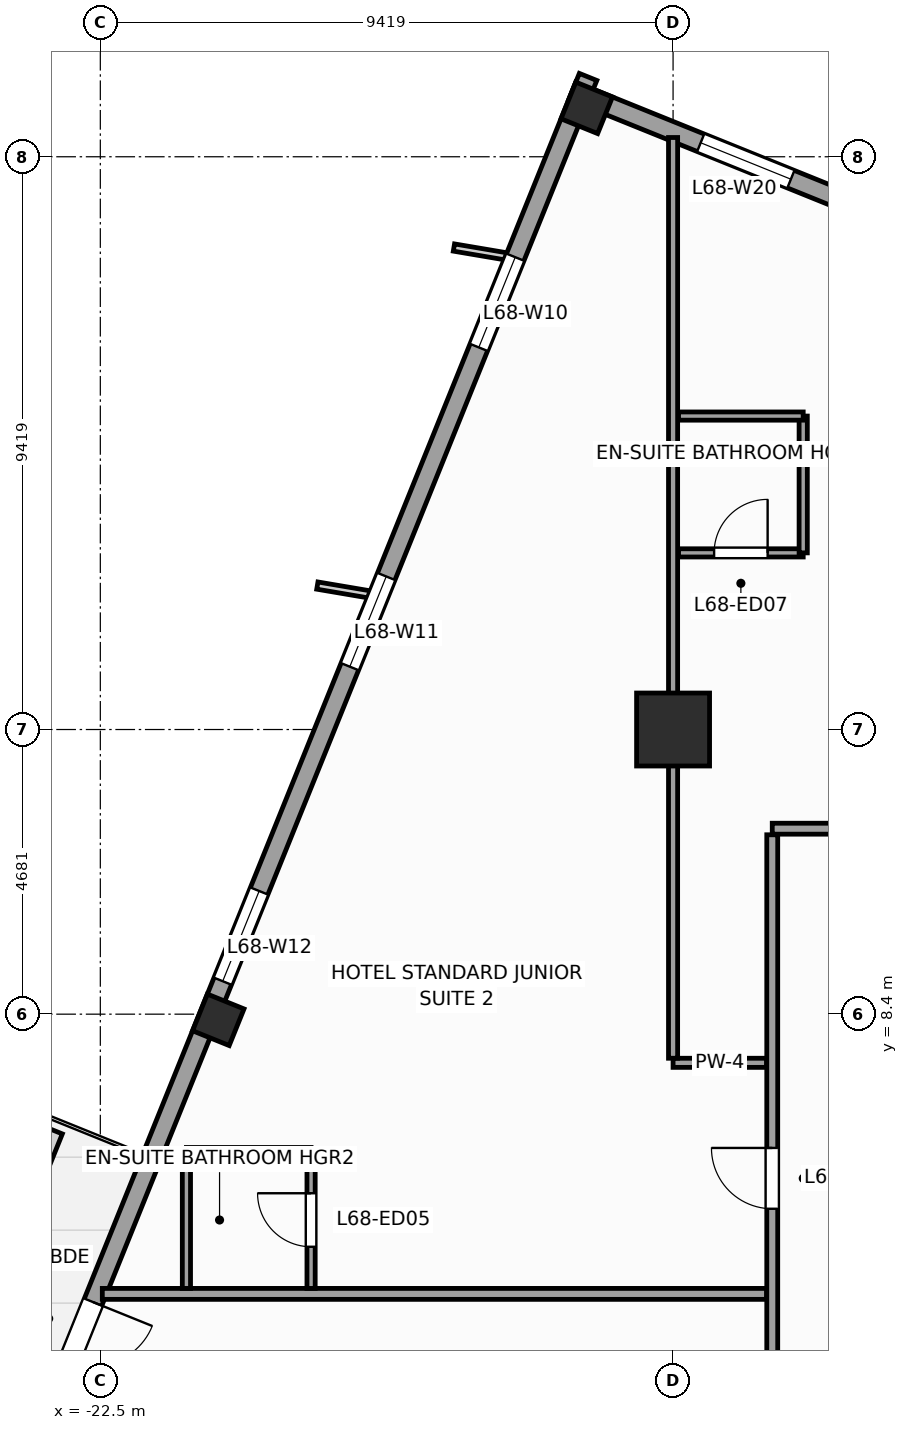
"""IFC4 building model, lengths in metres.
Left out: names, types, materials, properties, quantities, classifications, styles, units other than length and angle.
Written with IfcOpenShell. Run it as: python <this file> out.ifc"""

import sys

from ifc_helpers import new_model, si_unit, direction, frame, frame_2d, origin, origin_2d, place, context, subcontext, project, spatial, rectangle, extrude, source, transform, mapped, element, fill, save


model = new_model("IFC4")
c1 = context("Model", 3, precision=1e-05, world=origin(), true_north=direction((0.0, 1.0)))
c2 = subcontext(c1, "Body", "Model", "MODEL_VIEW")
j1 = project(units=[si_unit("LENGTHUNIT", "METRE"), si_unit("PLANEANGLEUNIT", "RADIAN")], contexts=[c1])
p1 = place(None, origin())
s1 = spatial("IfcSite", under=j1, at=p1, CompositionType="ELEMENT")
p2 = place(p1, origin())
s2 = spatial("IfcBuilding", under=s1, at=p2, CompositionType="ELEMENT")
p3 = place(p2, frame((0.0, 0.0, 279.6)))
s3 = spatial("IfcBuildingStorey", under=s2, at=p3, CompositionType="ELEMENT", Elevation=279.6)
m1 = source(origin(), c2, "Body", "SweptSolid", [
    extrude(rectangle(XDim=1.2, YDim=1.2, at=origin_2d()), origin(), (0.0, 0.0, 1.0), 3.6),
])
p4 = place(p3, frame((-13.081, 13.081, 0.0), z_axis=(0.0, 0.0, 1.0), x_axis=(1.0, 0.0, 0.0)))
e1 = element("IfcColumn", 1, at=p4, inside=s3, PredefinedType="COLUMN", context=c2, shape_type="MappedRepresentation", body=[
    mapped(m1, transform((0.0, 0.0, 0.0), scale=1.0)),
])
m2 = source(origin(), c2, "Body", "SweptSolid", [
    extrude(rectangle(XDim=0.65, YDim=0.65, at=origin_2d()), origin(), (0.0, 0.0, 1.0), 3.6),
])
for number, where, z_axis, x_axis in (
    (2, (-14.501, 23.304, 0.0), (0.0, 0.0, 1.0), (0.375, 0.927, 0.0)),
    (3, (-20.56, 8.307, 0.0), (0.0, 0.0, 1.0), (0.375, 0.927, 0.0)),
):
    element("IfcColumn", number, at=place(p3, frame(where, z_axis=z_axis, x_axis=x_axis)), inside=s3, PredefinedType="COLUMN", context=c2, shape_type="MappedRepresentation", body=[
        mapped(m2, transform((0.0, 0.0, 0.0), scale=1.0)),
    ])
p5 = place(p3, frame((-9.032, 21.278, 0.0), z_axis=(0.0, 0.0, 1.0), x_axis=(-0.927185411764, 0.374602739196, 0.0)))
e4 = element("IfcWall", 4, at=p5, inside=s3, PredefinedType="STANDARD", context=c2, shape_type="SweptSolid", body=[
    extrude(rectangle(XDim=6.155, YDim=0.31, at=frame_2d((3.078, 0.0))), origin(), (0.0, 0.0, 1.0), 3.35),
])
p6 = place(p5, frame((2.278, 0.0, 0.47)))
e5 = element("IfcOpeningElement", 5, at=p6, cuts=e4, PredefinedType="OPENING", context=c2, shape_type="SweptSolid", body=[
    extrude(rectangle(XDim=1.6, YDim=2.1, at=frame_2d((0.8, 1.05))), frame((0.0, 0.165, 0.0), z_axis=(0.0, -1.0, 0.0), x_axis=(1.0, 0.0, 0.0)), (0.0, 0.0, 1.0), 0.33),
])
p7 = place(p3, frame((-14.479, 23.813, 0.0), z_axis=(0.0, 0.0, 1.0), x_axis=(-0.374609557019, -0.927182657188, 0.0)))
e6 = element("IfcWall", 6, at=p7, inside=s3, PredefinedType="STANDARD", context=c2, shape_type="SweptSolid", body=[
    extrude(rectangle(XDim=33.31, YDim=0.31, at=frame_2d((16.655, 0.0))), origin(), (0.0, 0.0, 1.0), 2.75),
])
p8 = place(p7, frame((21.73, 0.0, 0.0)))
e7 = element("IfcOpeningElement", 7, at=p8, cuts=e6, PredefinedType="OPENING", context=c2, shape_type="SweptSolid", body=[
    extrude(rectangle(XDim=1.05, YDim=2.25, at=frame_2d((0.525, 1.125))), frame((0.0, 0.165, 0.0), z_axis=(0.0, -1.0, 0.0), x_axis=(1.0, 0.0, 0.0)), (0.0, 0.0, 1.0), 0.33),
])
p9 = place(p7, frame((3.197, 0.0, 0.47)))
e8 = element("IfcOpeningElement", 8, at=p9, cuts=e6, PredefinedType="OPENING", context=c2, shape_type="SweptSolid", body=[
    extrude(rectangle(XDim=1.6, YDim=2.1, at=frame_2d((0.8, 1.05))), frame((0.0, 0.165, 0.0), z_axis=(0.0, -1.0, 0.0), x_axis=(1.0, 0.0, 0.0)), (0.0, 0.0, 1.0), 0.33),
])
p10 = place(p7, frame((8.86, 0.0, 0.47)))
e9 = element("IfcOpeningElement", 9, at=p10, cuts=e6, PredefinedType="OPENING", context=c2, shape_type="SweptSolid", body=[
    extrude(rectangle(XDim=1.6, YDim=2.1, at=frame_2d((0.8, 1.05))), frame((0.0, 0.165, 0.0), z_axis=(0.0, -1.0, 0.0), x_axis=(1.0, 0.0, 0.0)), (0.0, 0.0, 1.0), 0.33),
])
p11 = place(p7, frame((14.439, 0.0, 0.47)))
e10 = element("IfcOpeningElement", 10, at=p11, cuts=e6, PredefinedType="OPENING", context=c2, shape_type="SweptSolid", body=[
    extrude(rectangle(XDim=1.6, YDim=2.1, at=frame_2d((0.8, 1.05))), frame((0.0, 0.165, 0.0), z_axis=(0.0, -1.0, 0.0), x_axis=(1.0, 0.0, 0.0)), (0.0, 0.0, 1.0), 0.33),
])
p12 = place(p7, frame((30.097, 0.0, 0.47)))
e11 = element("IfcOpeningElement", 11, at=p12, cuts=e6, PredefinedType="OPENING", context=c2, shape_type="SweptSolid", body=[
    extrude(rectangle(XDim=1.6, YDim=2.1, at=frame_2d((0.8, 1.05))), frame((0.0, 0.165, 0.0), z_axis=(0.0, -1.0, 0.0), x_axis=(1.0, 0.0, 0.0)), (0.0, 0.0, 1.0), 0.33),
])
p13 = place(p7, frame((27.59, 0.0, 0.47)))
e12 = element("IfcOpeningElement", 12, at=p13, cuts=e6, PredefinedType="OPENING", context=c2, shape_type="SweptSolid", body=[
    extrude(rectangle(XDim=1.6, YDim=2.1, at=frame_2d((0.8, 1.05))), frame((0.0, 0.165, 0.0), z_axis=(0.0, -1.0, 0.0), x_axis=(1.0, 0.0, 0.0)), (0.0, 0.0, 1.0), 0.33),
])
p14 = place(p3, frame((-11.45, 11.45, 0.0), z_axis=(0.0, 0.0, 1.0), x_axis=(1.0, 0.0, 0.0)))
e13 = element("IfcWall", 13, at=p14, inside=s3, PredefinedType="PARTITIONING", context=c2, shape_type="SweptSolid", body=[
    extrude(rectangle(XDim=21.75, YDim=0.18, at=frame_2d((10.875, 0.0))), origin(), (0.0, 0.0, 1.0), 3.35),
])
p15 = place(p14, frame((2.639, 0.0, 0.0)))
e14 = element("IfcOpeningElement", 14, at=p15, cuts=e13, PredefinedType="OPENING", context=c2, shape_type="SweptSolid", body=[
    extrude(rectangle(XDim=1.0, YDim=2.15, at=frame_2d((0.5, 1.075))), frame((0.0, 0.1, 0.0), z_axis=(0.0, -1.0, 0.0), x_axis=(1.0, 0.0, 0.0)), (0.0, 0.0, 1.0), 0.2),
])
p16 = place(p14, frame((7.8, 0.0, 0.0)))
e15 = element("IfcOpeningElement", 15, at=p16, cuts=e13, PredefinedType="OPENING", context=c2, shape_type="SweptSolid", body=[
    extrude(rectangle(XDim=1.0, YDim=2.15, at=frame_2d((0.5, 1.075))), frame((0.0, 0.1, 0.0), z_axis=(0.0, -1.0, 0.0), x_axis=(1.0, 0.0, 0.0)), (0.0, 0.0, 1.0), 0.2),
])
p17 = place(p14, frame((12.65, 0.0, 0.0)))
e16 = element("IfcOpeningElement", 16, at=p17, cuts=e13, PredefinedType="OPENING", context=c2, shape_type="SweptSolid", body=[
    extrude(rectangle(XDim=1.0, YDim=2.15, at=frame_2d((0.5, 1.075))), frame((0.0, 0.1, 0.0), z_axis=(0.0, -1.0, 0.0), x_axis=(1.0, 0.0, 0.0)), (0.0, 0.0, 1.0), 0.2),
])
p18 = place(p14, frame((18.036, 0.0, 0.0)))
e17 = element("IfcOpeningElement", 17, at=p18, cuts=e13, PredefinedType="OPENING", context=c2, shape_type="SweptSolid", body=[
    extrude(rectangle(XDim=1.0, YDim=2.15, at=frame_2d((0.5, 1.075))), frame((0.0, 0.1, 0.0), z_axis=(0.0, -1.0, 0.0), x_axis=(1.0, 0.0, 0.0)), (0.0, 0.0, 1.0), 0.2),
])
p19 = place(p3, frame((-11.45, -12.35, 0.0), z_axis=(0.0, 0.0, 1.0), x_axis=(0.0, 1.0, 0.0)))
e18 = element("IfcWall", 18, at=p19, inside=s3, PredefinedType="PARTITIONING", context=c2, shape_type="SweptSolid", body=[
    extrude(rectangle(XDim=23.7, YDim=0.18, at=frame_2d((11.85, 0.0))), origin(), (0.0, 0.0, 1.0), 3.35),
])
p20 = place(p19, frame((13.75, 0.0, 0.0)))
e19 = element("IfcOpeningElement", 19, at=p20, cuts=e18, PredefinedType="OPENING", context=c2, shape_type="SweptSolid", body=[
    extrude(rectangle(XDim=1.0, YDim=2.15, at=frame_2d((0.5, 1.075))), frame((0.0, 0.1, 0.0), z_axis=(0.0, -1.0, 0.0), x_axis=(1.0, 0.0, 0.0)), (0.0, 0.0, 1.0), 0.2),
])
p21 = place(p19, frame((17.55, 0.0, 0.0)))
e20 = element("IfcOpeningElement", 20, at=p21, cuts=e18, PredefinedType="OPENING", context=c2, shape_type="SweptSolid", body=[
    extrude(rectangle(XDim=1.0, YDim=2.15, at=frame_2d((0.5, 1.075))), frame((0.0, 0.1, 0.0), z_axis=(0.0, -1.0, 0.0), x_axis=(1.0, 0.0, 0.0)), (0.0, 0.0, 1.0), 0.2),
])
p22 = place(p19, frame((6.15, 0.0, 0.0)))
e21 = element("IfcOpeningElement", 21, at=p22, cuts=e18, PredefinedType="OPENING", context=c2, shape_type="SweptSolid", body=[
    extrude(rectangle(XDim=1.0, YDim=2.15, at=frame_2d((0.5, 1.075))), frame((0.0, 0.1, 0.0), z_axis=(0.0, -1.0, 0.0), x_axis=(1.0, 0.0, 0.0)), (0.0, 0.0, 1.0), 0.2),
])
p23 = place(p19, frame((9.95, 0.0, 0.0)))
e22 = element("IfcOpeningElement", 22, at=p23, cuts=e18, PredefinedType="OPENING", context=c2, shape_type="SweptSolid", body=[
    extrude(rectangle(XDim=1.0, YDim=2.15, at=frame_2d((0.5, 1.075))), frame((0.0, 0.1, 0.0), z_axis=(0.0, -1.0, 0.0), x_axis=(1.0, 0.0, 0.0)), (0.0, 0.0, 1.0), 0.2),
])
p24 = place(p3, frame((-11.545, 3.8, 0.0), z_axis=(0.0, 0.0, 1.0), x_axis=(-1.0, 0.0, 0.0)))
e23 = element("IfcWall", 23, at=p24, inside=s3, PredefinedType="PARTITIONING", context=c2, shape_type="SweptSolid", body=[
    extrude(rectangle(XDim=10.923, YDim=0.18, at=frame_2d((5.461, 0.0))), origin(), (0.0, 0.0, 1.0), 3.35),
])
p25 = place(p3, frame((-11.545, 7.6, 0.0), z_axis=(0.0, 0.0, 1.0), x_axis=(-1.0, 0.0, 0.0)))
e24 = element("IfcWall", 24, at=p25, inside=s3, PredefinedType="PARTITIONING", context=c2, shape_type="SweptSolid", body=[
    extrude(rectangle(XDim=1.536, YDim=0.15, at=frame_2d((0.768, 0.0))), origin(), (0.0, 0.0, 1.0), 3.35),
])
p26 = place(p3, frame((-13.081, 7.675, 0.0), z_axis=(0.0, 0.0, 1.0), x_axis=(0.0, 1.0, 0.0)))
e25 = element("IfcWall", 25, at=p26, inside=s3, PredefinedType="PARTITIONING", context=c2, shape_type="SweptSolid", body=[
    extrude(rectangle(XDim=15.142, YDim=0.15, at=frame_2d((7.571, 0.0))), origin(), (0.0, 0.0, 1.0), 2.45),
])
p27 = place(p3, frame((-19.034, 3.89, 0.0), z_axis=(0.0, 0.0, 1.0), x_axis=(0.0, 1.0, 0.0)))
e26 = element("IfcWall", 26, at=p27, inside=s3, PredefinedType="PARTITIONING", context=c2, shape_type="SweptSolid", body=[
    extrude(rectangle(XDim=2.25, YDim=0.135, at=frame_2d((1.125, 0.0))), origin(), (0.0, 0.0, 1.0), 3.35),
])
p28 = place(p27, frame((0.685, 0.0, 0.0)))
e27 = element("IfcOpeningElement", 27, at=p28, cuts=e26, PredefinedType="OPENING", context=c2, shape_type="SweptSolid", body=[
    extrude(rectangle(XDim=0.88, YDim=2.1, at=frame_2d((0.44, 1.05))), frame((0.0, 0.078, 0.0), z_axis=(0.0, -1.0, 0.0), x_axis=(1.0, 0.0, 0.0)), (0.0, 0.0, 1.0), 0.155),
])
p29 = place(p3, frame((-21.084, 6.14, 0.0), z_axis=(0.0, 0.0, 1.0), x_axis=(1.0, 0.0, 0.0)))
e28 = element("IfcWall", 28, at=p29, inside=s3, PredefinedType="PARTITIONING", context=c2, shape_type="SweptSolid", body=[
    extrude(rectangle(XDim=2.05, YDim=0.135, at=frame_2d((1.025, 0.0))), origin(), (0.0, 0.0, 1.0), 3.35),
])
p30 = place(p3, frame((-21.084, 3.89, 0.0), z_axis=(0.0, 0.0, 1.0), x_axis=(0.0, 1.0, 0.0)))
e29 = element("IfcWall", 29, at=p30, inside=s3, PredefinedType="PARTITIONING", context=c2, shape_type="SweptSolid", body=[
    extrude(rectangle(XDim=2.25, YDim=0.135, at=frame_2d((1.125, 0.0))), origin(), (0.0, 0.0, 1.0), 3.35),
])
p31 = place(p3, frame((-12.991, 15.986, 0.0), z_axis=(0.0, 0.0, 1.0), x_axis=(1.0, 0.0, 0.0)))
e30 = element("IfcWall", 30, at=p31, inside=s3, PredefinedType="PARTITIONING", context=c2, shape_type="SweptSolid", body=[
    extrude(rectangle(XDim=2.05, YDim=0.135, at=frame_2d((1.025, 0.0))), origin(), (0.0, 0.0, 1.0), 3.35),
])
p32 = place(p31, frame((0.585, 0.0, 0.0)))
e31 = element("IfcOpeningElement", 31, at=p32, cuts=e30, PredefinedType="OPENING", context=c2, shape_type="SweptSolid", body=[
    extrude(rectangle(XDim=0.88, YDim=2.1, at=frame_2d((0.44, 1.05))), frame((0.0, 0.078, 0.0), z_axis=(0.0, -1.0, 0.0), x_axis=(1.0, 0.0, 0.0)), (0.0, 0.0, 1.0), 0.155),
])
p33 = place(p3, frame((-10.941, 15.986, 0.0), z_axis=(0.0, 0.0, 1.0), x_axis=(0.0, 1.0, 0.0)))
e32 = element("IfcWall", 32, at=p33, inside=s3, PredefinedType="PARTITIONING", context=c2, shape_type="SweptSolid", body=[
    extrude(rectangle(XDim=2.25, YDim=0.135, at=frame_2d((1.125, 0.0))), origin(), (0.0, 0.0, 1.0), 3.35),
])
p34 = place(p3, frame((-12.991, 18.236, 0.0), z_axis=(0.0, 0.0, 1.0), x_axis=(1.0, 0.0, 0.0)))
e33 = element("IfcWall", 33, at=p34, inside=s3, PredefinedType="PARTITIONING", context=c2, shape_type="SweptSolid", body=[
    extrude(rectangle(XDim=2.05, YDim=0.135, at=frame_2d((1.025, 0.0))), origin(), (0.0, 0.0, 1.0), 3.35),
])
m3 = source(origin(), c2, "Body", "SweptSolid", [
    extrude(rectangle(XDim=1.05, YDim=2.25, at=frame_2d((0.525, 1.125))), frame((0.0, 0.025, 0.0), z_axis=(0.0, -1.0, 0.0), x_axis=(1.0, 0.0, 0.0)), (0.0, 0.0, 1.0), 0.05),
])
p35 = place(p8, origin())
e34 = element("IfcDoor", 34, at=p35, inside=s3, OperationType="SINGLE_SWING_LEFT", PredefinedType="DOOR", context=c2, shape_type="MappedRepresentation", body=[
    mapped(m3, transform((0.0, 0.0, 0.0), scale=1.0)),
])
fill(e7, e34)
m4 = source(origin(), c2, "Body", "SweptSolid", [
    extrude(rectangle(XDim=1.6, YDim=2.1, at=frame_2d((0.8, 1.05))), frame((0.0, 0.03, 0.0), z_axis=(0.0, -1.0, 0.0), x_axis=(1.0, 0.0, 0.0)), (0.0, 0.0, 1.0), 0.06),
])
p36 = place(p9, origin())
e35 = element("IfcWindow", 35, at=p36, inside=s3, PartitioningType="SINGLE_PANEL", PredefinedType="WINDOW", context=c2, shape_type="MappedRepresentation", body=[
    mapped(m4, transform((0.0, 0.0, 0.0), scale=1.0)),
])
fill(e8, e35)
p37 = place(p10, origin())
e36 = element("IfcWindow", 36, at=p37, inside=s3, PartitioningType="SINGLE_PANEL", PredefinedType="WINDOW", context=c2, shape_type="MappedRepresentation", body=[
    mapped(m4, transform((0.0, 0.0, 0.0), scale=1.0)),
])
fill(e9, e36)
p38 = place(p11, origin())
e37 = element("IfcWindow", 37, at=p38, inside=s3, PartitioningType="SINGLE_PANEL", PredefinedType="WINDOW", context=c2, shape_type="MappedRepresentation", body=[
    mapped(m4, transform((0.0, 0.0, 0.0), scale=1.0)),
])
fill(e10, e37)
p39 = place(p6, origin())
e38 = element("IfcWindow", 38, at=p39, inside=s3, PartitioningType="SINGLE_PANEL", PredefinedType="WINDOW", context=c2, shape_type="MappedRepresentation", body=[
    mapped(m4, transform((0.0, 0.0, 0.0), scale=1.0)),
])
fill(e5, e38)
m5 = source(origin(), c2, "Body", "SweptSolid", [
    extrude(rectangle(XDim=1.0, YDim=2.15, at=frame_2d((0.5, 1.075))), frame((0.0, 0.025, 0.0), z_axis=(0.0, -1.0, 0.0), x_axis=(1.0, 0.0, 0.0)), (0.0, 0.0, 1.0), 0.05),
])
p40 = place(p21, origin())
e39 = element("IfcDoor", 39, at=p40, inside=s3, OperationType="SINGLE_SWING_RIGHT", PredefinedType="DOOR", context=c2, shape_type="MappedRepresentation", body=[
    mapped(m5, transform((0.0, 0.0, 0.0), scale=1.0)),
])
fill(e20, e39)
m6 = source(origin(), c2, "Body", "SweptSolid", [
    extrude(rectangle(XDim=0.88, YDim=2.1, at=frame_2d((0.44, 1.05))), frame((0.0, 0.025, 0.0), z_axis=(0.0, -1.0, 0.0), x_axis=(1.0, 0.0, 0.0)), (0.0, 0.0, 1.0), 0.05),
])
p41 = place(p28, origin())
e40 = element("IfcDoor", 40, at=p41, inside=s3, OperationType="SINGLE_SWING_RIGHT", PredefinedType="DOOR", context=c2, shape_type="MappedRepresentation", body=[
    mapped(m6, transform((0.0, 0.0, 0.0), scale=1.0)),
])
fill(e27, e40)
p42 = place(p32, origin())
e41 = element("IfcDoor", 41, at=p42, inside=s3, OperationType="SINGLE_SWING_RIGHT", PredefinedType="DOOR", context=c2, shape_type="MappedRepresentation", body=[
    mapped(m6, transform((0.0, 0.0, 0.0), scale=1.0)),
])
fill(e31, e41)
save(model, sys.argv[1])
